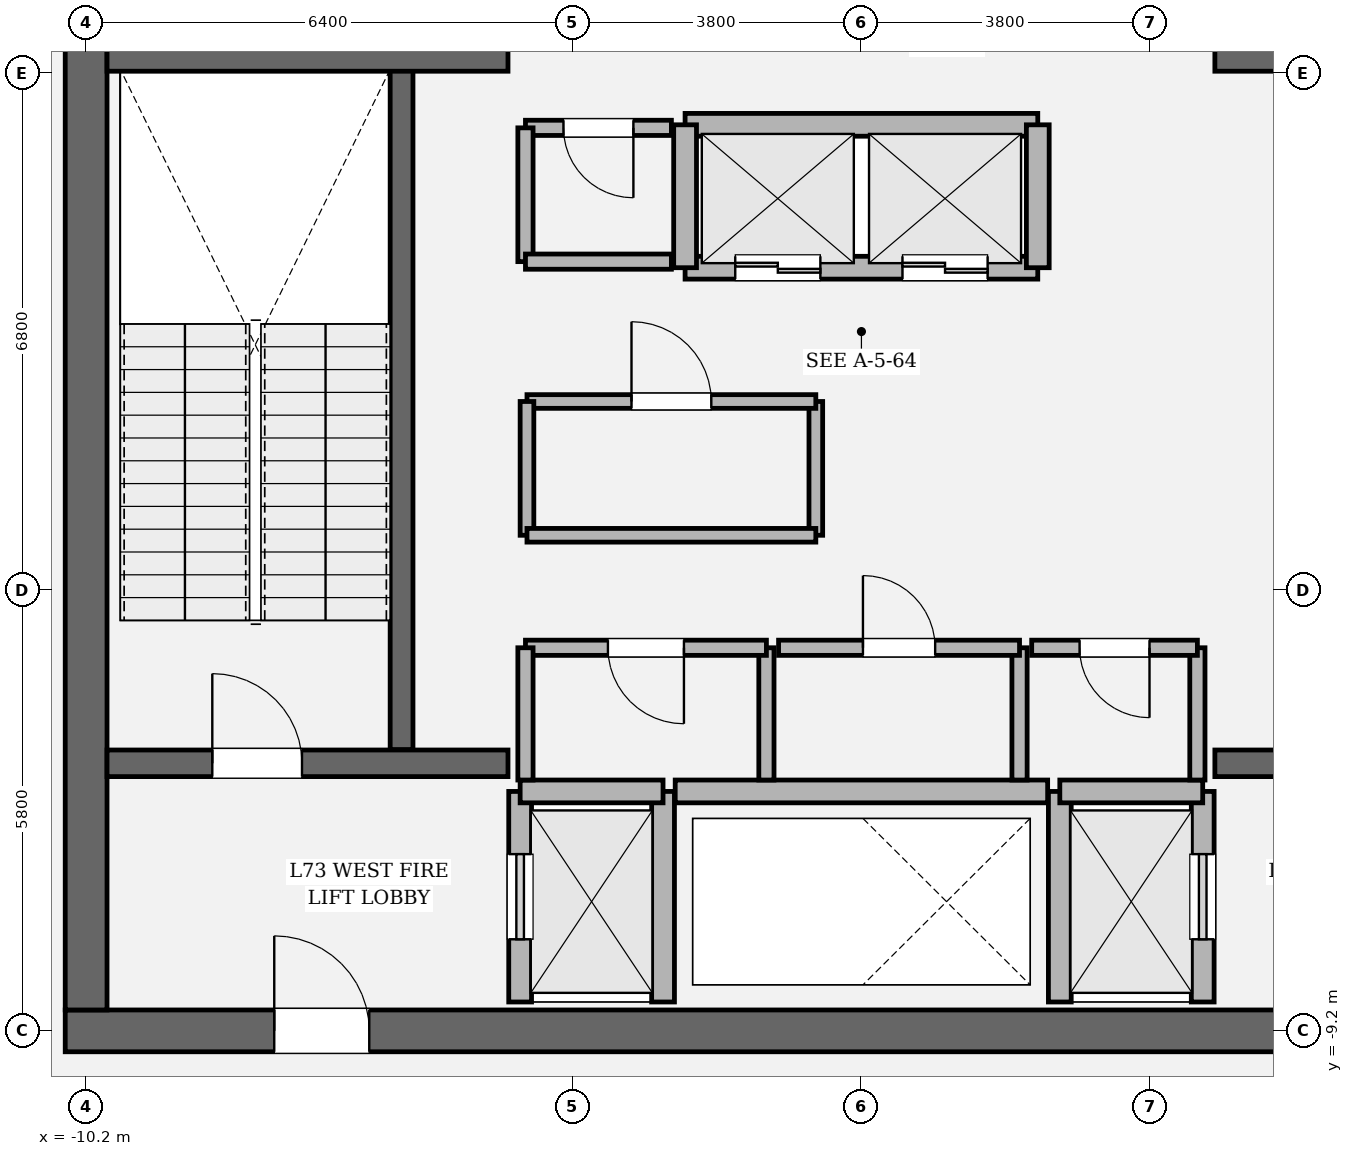
"""IFC4 building model, lengths in metres.
Left out: names, types, materials, properties, quantities, classifications, styles, units other than length and angle.
Written with IfcOpenShell. Run it as: python <this file> out.ifc"""

import sys

from ifc_helpers import new_model, si_unit, direction, frame, frame_2d, origin, place, context, subcontext, project, spatial, rectangle, extrude, element, fill, save


model = new_model("IFC4")
c1 = context("Model", 3, precision=1e-05, world=origin(), true_north=direction((0.0, 1.0)))
c2 = subcontext(c1, "Body", "Model", "MODEL_VIEW")
j1 = project(units=[si_unit("LENGTHUNIT", "METRE"), si_unit("PLANEANGLEUNIT", "RADIAN")], contexts=[c1])
p1 = place(None, origin())
s1 = spatial("IfcSite", under=j1, at=p1, CompositionType="ELEMENT")
p2 = place(p1, origin())
s2 = spatial("IfcBuilding", under=s1, at=p2, CompositionType="ELEMENT")
p3 = place(p2, frame((0.0, 0.0, 309.0)))
s3 = spatial("IfcBuildingStorey", under=s2, at=p3, CompositionType="ELEMENT", Elevation=309.0)
p4 = place(p3, frame((10.475, -9.2, 0.0), z_axis=(0.0, 0.0, 1.0), x_axis=(-1.0, 0.0, 0.0)))
e1 = element("IfcWall", 1, at=p4, inside=s3, PredefinedType="SHEAR", context=c2, shape_type="SweptSolid", body=[
    extrude(rectangle(XDim=20.95, YDim=0.55, at=frame_2d((10.475, 0.0))), origin(), (0.0, 0.0, 1.0), 4.2),
])
p5 = place(p4, frame((2.75, 0.0, 0.0)))
e2 = element("IfcOpeningElement", 2, at=p5, cuts=e1, PredefinedType="OPENING", context=c2, shape_type="SweptSolid", body=[
    extrude(rectangle(XDim=1.25, YDim=2.25, at=frame_2d((0.625, 1.125))), frame((0.0, 0.285, 0.0), z_axis=(0.0, -1.0, 0.0), x_axis=(1.0, 0.0, 0.0)), (0.0, 0.0, 1.0), 0.57),
])
p6 = place(p4, frame((16.95, 0.0, 0.0)))
e3 = element("IfcOpeningElement", 3, at=p6, cuts=e1, PredefinedType="OPENING", context=c2, shape_type="SweptSolid", body=[
    extrude(rectangle(XDim=1.25, YDim=2.25, at=frame_2d((0.625, 1.125))), frame((0.0, 0.285, 0.0), z_axis=(0.0, -1.0, 0.0), x_axis=(1.0, 0.0, 0.0)), (0.0, 0.0, 1.0), 0.57),
])
p7 = place(p3, frame((-10.2, -8.925, 0.0), z_axis=(0.0, 0.0, 1.0), x_axis=(0.0, 1.0, 0.0)))
e4 = element("IfcWall", 4, at=p7, inside=s3, PredefinedType="SHEAR", context=c2, shape_type="SweptSolid", body=[
    extrude(rectangle(XDim=17.85, YDim=0.55, at=frame_2d((8.925, 0.0))), origin(), (0.0, 0.0, 1.0), 4.2),
])
p8 = place(p7, frame((12.715, 0.0, 0.0)))
e5 = element("IfcOpeningElement", 5, at=p8, cuts=e4, PredefinedType="OPENING", context=c2, shape_type="SweptSolid", body=[
    extrude(rectangle(XDim=1.18, YDim=2.2, at=frame_2d((0.59, 1.1))), frame((0.0, 0.285, 0.0), z_axis=(0.0, -1.0, 0.0), x_axis=(1.0, 0.0, 0.0)), (0.0, 0.0, 1.0), 0.57),
])
p9 = place(p3, frame((-6.05, -5.5, 0.0), z_axis=(0.0, 0.0, 1.0), x_axis=(0.0, 1.0, 0.0)))
e6 = element("IfcWall", 6, at=p9, inside=s3, PredefinedType="SOLIDWALL", context=c2, shape_type="SweptSolid", body=[
    extrude(rectangle(XDim=8.95, YDim=0.3, at=frame_2d((4.475, 0.0))), origin(), (0.0, 0.0, 1.0), 4.2),
])
p10 = place(p3, frame((-9.925, -5.68, 0.0), z_axis=(0.0, 0.0, 1.0), x_axis=(1.0, 0.0, 0.0)))
e7 = element("IfcWall", 7, at=p10, inside=s3, PredefinedType="SOLIDWALL", context=c2, shape_type="SweptSolid", body=[
    extrude(rectangle(XDim=5.275, YDim=0.35, at=frame_2d((2.638, 0.0))), origin(), (0.0, 0.0, 1.0), 4.2),
])
p11 = place(p10, frame((1.385, 0.0, 0.0)))
e8 = element("IfcOpeningElement", 8, at=p11, cuts=e7, PredefinedType="OPENING", context=c2, shape_type="SweptSolid", body=[
    extrude(rectangle(XDim=1.18, YDim=2.2, at=frame_2d((0.59, 1.1))), frame((0.0, 0.185, 0.0), z_axis=(0.0, -1.0, 0.0), x_axis=(1.0, 0.0, 0.0)), (0.0, 0.0, 1.0), 0.37),
])
p12 = place(p3, frame((4.65, -5.68, 0.0), z_axis=(0.0, 0.0, 1.0), x_axis=(1.0, 0.0, 0.0)))
e9 = element("IfcWall", 9, at=p12, inside=s3, PredefinedType="SOLIDWALL", context=c2, shape_type="SweptSolid", body=[
    extrude(rectangle(XDim=5.275, YDim=0.35, at=frame_2d((2.638, 0.0))), origin(), (0.0, 0.0, 1.0), 4.2),
])
p13 = place(p12, frame((2.71, 0.0, 0.0)))
e10 = element("IfcOpeningElement", 10, at=p13, cuts=e9, PredefinedType="OPENING", context=c2, shape_type="SweptSolid", body=[
    extrude(rectangle(XDim=1.18, YDim=2.2, at=frame_2d((0.59, 1.1))), frame((0.0, 0.185, 0.0), z_axis=(0.0, -1.0, 0.0), x_axis=(1.0, 0.0, 0.0)), (0.0, 0.0, 1.0), 0.37),
])
for number, where, z_axis, x_axis in (
    (11, (-9.925, 3.6, 0.0), (0.0, 0.0, 1.0), (1.0, 0.0, 0.0)),
    (12, (4.65, 3.6, 0.0), (0.0, 0.0, 1.0), (1.0, 0.0, 0.0)),
):
    element("IfcWall", number, at=place(p3, frame(where, z_axis=z_axis, x_axis=x_axis)), inside=s3, PredefinedType="SOLIDWALL", context=c2, shape_type="SweptSolid", body=[
        extrude(rectangle(XDim=5.275, YDim=0.35, at=frame_2d((2.638, 0.0))), origin(), (0.0, 0.0, 1.0), 4.2),
    ])
p14 = place(p3, frame((-4.49, -8.82, 0.0), z_axis=(0.0, 0.0, 1.0), x_axis=(0.0, 1.0, 0.0)))
e13 = element("IfcWall", 13, at=p14, inside=s3, PredefinedType="SOLIDWALL", context=c2, shape_type="SweptSolid", body=[
    extrude(rectangle(XDim=2.77, YDim=0.3, at=frame_2d((1.385, 0.0))), origin(), (0.0, 0.0, 1.0), 4.0),
])
p15 = place(p14, frame((0.825, 0.0, 0.0)))
e14 = element("IfcOpeningElement", 14, at=p15, cuts=e13, PredefinedType="OPENING", context=c2, shape_type="SweptSolid", body=[
    extrude(rectangle(XDim=1.12, YDim=2.25, at=frame_2d((0.56, 1.125))), frame((0.0, 0.16, 0.0), z_axis=(0.0, -1.0, 0.0), x_axis=(1.0, 0.0, 0.0)), (0.0, 0.0, 1.0), 0.32),
])
p16 = place(p3, frame((-2.61, -8.82, 0.0), z_axis=(0.0, 0.0, 1.0), x_axis=(0.0, 1.0, 0.0)))
e15 = element("IfcWall", 15, at=p16, inside=s3, PredefinedType="SOLIDWALL", context=c2, shape_type="SweptSolid", body=[
    extrude(rectangle(XDim=2.77, YDim=0.3, at=frame_2d((1.385, 0.0))), origin(), (0.0, 0.0, 1.0), 4.0),
])
p17 = place(p3, frame((-4.49, -6.05, 0.0), z_axis=(0.0, 0.0, 1.0), x_axis=(1.0, 0.0, 0.0)))
e16 = element("IfcWall", 16, at=p17, inside=s3, PredefinedType="SOLIDWALL", context=c2, shape_type="SweptSolid", body=[
    extrude(rectangle(XDim=1.88, YDim=0.3, at=frame_2d((0.94, 0.0))), origin(), (0.0, 0.0, 1.0), 4.0),
])
p18 = place(p3, frame((4.49, -8.82, 0.0), z_axis=(0.0, 0.0, 1.0), x_axis=(0.0, 1.0, 0.0)))
e17 = element("IfcWall", 17, at=p18, inside=s3, PredefinedType="SOLIDWALL", context=c2, shape_type="SweptSolid", body=[
    extrude(rectangle(XDim=2.77, YDim=0.3, at=frame_2d((1.385, 0.0))), origin(), (0.0, 0.0, 1.0), 4.0),
])
p19 = place(p18, frame((0.825, 0.0, 0.0)))
e18 = element("IfcOpeningElement", 18, at=p19, cuts=e17, PredefinedType="OPENING", context=c2, shape_type="SweptSolid", body=[
    extrude(rectangle(XDim=1.12, YDim=2.25, at=frame_2d((0.56, 1.125))), frame((0.0, 0.16, 0.0), z_axis=(0.0, -1.0, 0.0), x_axis=(1.0, 0.0, 0.0)), (0.0, 0.0, 1.0), 0.32),
])
p20 = place(p3, frame((2.61, -8.82, 0.0), z_axis=(0.0, 0.0, 1.0), x_axis=(0.0, 1.0, 0.0)))
e19 = element("IfcWall", 19, at=p20, inside=s3, PredefinedType="SOLIDWALL", context=c2, shape_type="SweptSolid", body=[
    extrude(rectangle(XDim=2.77, YDim=0.3, at=frame_2d((1.385, 0.0))), origin(), (0.0, 0.0, 1.0), 4.0),
])
p21 = place(p3, frame((2.61, -6.05, 0.0), z_axis=(0.0, 0.0, 1.0), x_axis=(1.0, 0.0, 0.0)))
e20 = element("IfcWall", 20, at=p21, inside=s3, PredefinedType="SOLIDWALL", context=c2, shape_type="SweptSolid", body=[
    extrude(rectangle(XDim=1.88, YDim=0.3, at=frame_2d((0.94, 0.0))), origin(), (0.0, 0.0, 1.0), 4.0),
])
p22 = place(p3, frame((-2.32, 0.84, 0.0), z_axis=(0.0, 0.0, 1.0), x_axis=(1.0, 0.0, 0.0)))
e21 = element("IfcWall", 21, at=p22, inside=s3, PredefinedType="SOLIDWALL", context=c2, shape_type="SweptSolid", body=[
    extrude(rectangle(XDim=4.64, YDim=0.3, at=frame_2d((2.32, 0.0))), origin(), (0.0, 0.0, 1.0), 4.0),
])
p23 = place(p22, frame((0.66, 0.0, 0.0)))
e22 = element("IfcOpeningElement", 22, at=p23, cuts=e21, PredefinedType="OPENING", context=c2, shape_type="SweptSolid", body=[
    extrude(rectangle(XDim=1.12, YDim=2.25, at=frame_2d((0.56, 1.125))), frame((0.0, 0.16, 0.0), z_axis=(0.0, -1.0, 0.0), x_axis=(1.0, 0.0, 0.0)), (0.0, 0.0, 1.0), 0.32),
])
p24 = place(p22, frame((2.86, 0.0, 0.0)))
e23 = element("IfcOpeningElement", 23, at=p24, cuts=e21, PredefinedType="OPENING", context=c2, shape_type="SweptSolid", body=[
    extrude(rectangle(XDim=1.12, YDim=2.25, at=frame_2d((0.56, 1.125))), frame((0.0, 0.16, 0.0), z_axis=(0.0, -1.0, 0.0), x_axis=(1.0, 0.0, 0.0)), (0.0, 0.0, 1.0), 0.32),
])
p25 = place(p3, frame((-2.32, 2.72, 0.0), z_axis=(0.0, 0.0, 1.0), x_axis=(1.0, 0.0, 0.0)))
e24 = element("IfcWall", 24, at=p25, inside=s3, PredefinedType="SOLIDWALL", context=c2, shape_type="SweptSolid", body=[
    extrude(rectangle(XDim=4.64, YDim=0.3, at=frame_2d((2.32, 0.0))), origin(), (0.0, 0.0, 1.0), 4.0),
])
for number, where, z_axis, x_axis in (
    (25, (-2.32, 0.84, 0.0), (0.0, 0.0, 1.0), (0.0, 1.0, 0.0)),
    (26, (2.32, 0.84, 0.0), (0.0, 0.0, 1.0), (0.0, 1.0, 0.0)),
):
    element("IfcWall", number, at=place(p3, frame(where, z_axis=z_axis, x_axis=x_axis)), inside=s3, PredefinedType="SOLIDWALL", context=c2, shape_type="SweptSolid", body=[
        extrude(rectangle(XDim=1.88, YDim=0.3, at=frame_2d((0.94, 0.0))), origin(), (0.0, 0.0, 1.0), 4.0),
    ])
p26 = place(p3, frame((-2.45, -6.05, 0.0), z_axis=(0.0, 0.0, 1.0), x_axis=(1.0, 0.0, 0.0)))
e27 = element("IfcWall", 27, at=p26, inside=s3, PredefinedType="SOLIDWALL", context=c2, shape_type="SweptSolid", body=[
    extrude(rectangle(XDim=4.9, YDim=0.3, at=frame_2d((2.45, 0.0))), origin(), (0.0, 0.0, 1.0), 4.0),
])
p27 = place(p3, frame((-1.25, -5.9, 0.0), z_axis=(0.0, 0.0, 1.0), x_axis=(0.0, 1.0, 0.0)))
e28 = element("IfcWall", 28, at=p27, inside=s3, PredefinedType="SOLIDWALL", context=c2, shape_type="SweptSolid", body=[
    extrude(rectangle(XDim=1.74, YDim=0.2, at=frame_2d((0.87, 0.0))), origin(), (0.0, 0.0, 1.0), 4.0),
])
p28 = place(p3, frame((-1.25, -4.16, 0.0), z_axis=(0.0, 0.0, 1.0), x_axis=(-1.0, 0.0, 0.0)))
e29 = element("IfcWall", 29, at=p28, inside=s3, PredefinedType="SOLIDWALL", context=c2, shape_type="SweptSolid", body=[
    extrude(rectangle(XDim=3.17, YDim=0.2, at=frame_2d((1.585, 0.0))), origin(), (0.0, 0.0, 1.0), 4.0),
])
p29 = place(p28, frame((1.085, 0.0, 0.0)))
e30 = element("IfcOpeningElement", 30, at=p29, cuts=e29, PredefinedType="OPENING", context=c2, shape_type="SweptSolid", body=[
    extrude(rectangle(XDim=1.0, YDim=2.15, at=frame_2d((0.5, 1.075))), frame((0.0, 0.11, 0.0), z_axis=(0.0, -1.0, 0.0), x_axis=(1.0, 0.0, 0.0)), (0.0, 0.0, 1.0), 0.22),
])
for number, where, z_axis, x_axis in (
    (31, (-4.42, -4.16, 0.0), (0.0, 0.0, 1.0), (0.0, -1.0, 0.0)),
    (32, (2.08, -5.9, 0.0), (0.0, 0.0, 1.0), (0.0, 1.0, 0.0)),
):
    element("IfcWall", number, at=place(p3, frame(where, z_axis=z_axis, x_axis=x_axis)), inside=s3, PredefinedType="SOLIDWALL", context=c2, shape_type="SweptSolid", body=[
        extrude(rectangle(XDim=1.74, YDim=0.2, at=frame_2d((0.87, 0.0))), origin(), (0.0, 0.0, 1.0), 4.0),
    ])
p30 = place(p3, frame((2.08, -4.16, 0.0), z_axis=(0.0, 0.0, 1.0), x_axis=(-1.0, 0.0, 0.0)))
e33 = element("IfcWall", 33, at=p30, inside=s3, PredefinedType="SOLIDWALL", context=c2, shape_type="SweptSolid", body=[
    extrude(rectangle(XDim=3.17, YDim=0.2, at=frame_2d((1.585, 0.0))), origin(), (0.0, 0.0, 1.0), 4.0),
])
p31 = place(p30, frame((1.11, 0.0, 0.0)))
e34 = element("IfcOpeningElement", 34, at=p31, cuts=e33, PredefinedType="OPENING", context=c2, shape_type="SweptSolid", body=[
    extrude(rectangle(XDim=0.95, YDim=2.15, at=frame_2d((0.475, 1.075))), frame((0.0, 0.11, 0.0), z_axis=(0.0, -1.0, 0.0), x_axis=(1.0, 0.0, 0.0)), (0.0, 0.0, 1.0), 0.22),
])
p32 = place(p3, frame((4.42, -5.9, 0.0), z_axis=(0.0, 0.0, 1.0), x_axis=(0.0, 1.0, 0.0)))
e35 = element("IfcWall", 35, at=p32, inside=s3, PredefinedType="SOLIDWALL", context=c2, shape_type="SweptSolid", body=[
    extrude(rectangle(XDim=1.74, YDim=0.2, at=frame_2d((0.87, 0.0))), origin(), (0.0, 0.0, 1.0), 4.0),
])
p33 = place(p3, frame((4.42, -4.16, 0.0), z_axis=(0.0, 0.0, 1.0), x_axis=(-1.0, 0.0, 0.0)))
e36 = element("IfcWall", 36, at=p33, inside=s3, PredefinedType="SOLIDWALL", context=c2, shape_type="SweptSolid", body=[
    extrude(rectangle(XDim=2.18, YDim=0.2, at=frame_2d((1.09, 0.0))), origin(), (0.0, 0.0, 1.0), 4.0),
])
p34 = place(p33, frame((0.63, 0.0, 0.0)))
e37 = element("IfcOpeningElement", 37, at=p34, cuts=e36, PredefinedType="OPENING", context=c2, shape_type="SweptSolid", body=[
    extrude(rectangle(XDim=0.92, YDim=2.1, at=frame_2d((0.46, 1.05))), frame((0.0, 0.11, 0.0), z_axis=(0.0, -1.0, 0.0), x_axis=(1.0, 0.0, 0.0)), (0.0, 0.0, 1.0), 0.22),
])
p35 = place(p3, frame((-0.6, -2.68, 0.0), z_axis=(0.0, 0.0, 1.0), x_axis=(0.0, 1.0, 0.0)))
e38 = element("IfcWall", 38, at=p35, inside=s3, PredefinedType="PARTITIONING", context=c2, shape_type="SweptSolid", body=[
    extrude(rectangle(XDim=1.76, YDim=0.18, at=frame_2d((0.88, 0.0))), origin(), (0.0, 0.0, 1.0), 4.0),
])
p36 = place(p3, frame((-0.6, -0.92, 0.0), z_axis=(0.0, 0.0, 1.0), x_axis=(-1.0, 0.0, 0.0)))
e39 = element("IfcWall", 39, at=p36, inside=s3, PredefinedType="PARTITIONING", context=c2, shape_type="SweptSolid", body=[
    extrude(rectangle(XDim=3.8, YDim=0.18, at=frame_2d((1.9, 0.0))), origin(), (0.0, 0.0, 1.0), 4.0),
])
p37 = place(p36, frame((1.375, 0.0, 0.0)))
e40 = element("IfcOpeningElement", 40, at=p37, cuts=e39, PredefinedType="OPENING", context=c2, shape_type="SweptSolid", body=[
    extrude(rectangle(XDim=1.05, YDim=2.2, at=frame_2d((0.525, 1.1))), frame((0.0, 0.1, 0.0), z_axis=(0.0, -1.0, 0.0), x_axis=(1.0, 0.0, 0.0)), (0.0, 0.0, 1.0), 0.2),
])
p38 = place(p3, frame((-4.4, -0.92, 0.0), z_axis=(0.0, 0.0, 1.0), x_axis=(0.0, -1.0, 0.0)))
e41 = element("IfcWall", 41, at=p38, inside=s3, PredefinedType="PARTITIONING", context=c2, shape_type="SweptSolid", body=[
    extrude(rectangle(XDim=1.76, YDim=0.18, at=frame_2d((0.88, 0.0))), origin(), (0.0, 0.0, 1.0), 4.0),
])
p39 = place(p3, frame((-4.4, -2.68, 0.0), z_axis=(0.0, 0.0, 1.0), x_axis=(1.0, 0.0, 0.0)))
e42 = element("IfcWall", 42, at=p39, inside=s3, PredefinedType="PARTITIONING", context=c2, shape_type="SweptSolid", body=[
    extrude(rectangle(XDim=3.8, YDim=0.18, at=frame_2d((1.9, 0.0))), origin(), (0.0, 0.0, 1.0), 4.0),
])
p40 = place(p3, frame((-2.5, 2.68, 0.0), z_axis=(0.0, 0.0, 1.0), x_axis=(-1.0, 0.0, 0.0)))
e43 = element("IfcWall", 43, at=p40, inside=s3, PredefinedType="SOLIDWALL", context=c2, shape_type="SweptSolid", body=[
    extrude(rectangle(XDim=1.92, YDim=0.2, at=frame_2d((0.96, 0.0))), origin(), (0.0, 0.0, 1.0), 4.0),
])
p41 = place(p40, frame((0.5, 0.0, 0.0)))
e44 = element("IfcOpeningElement", 44, at=p41, cuts=e43, PredefinedType="OPENING", context=c2, shape_type="SweptSolid", body=[
    extrude(rectangle(XDim=0.92, YDim=2.1, at=frame_2d((0.46, 1.05))), frame((0.0, 0.11, 0.0), z_axis=(0.0, -1.0, 0.0), x_axis=(1.0, 0.0, 0.0)), (0.0, 0.0, 1.0), 0.22),
])
p42 = place(p3, frame((-4.42, 2.68, 0.0), z_axis=(0.0, 0.0, 1.0), x_axis=(0.0, -1.0, 0.0)))
e45 = element("IfcWall", 45, at=p42, inside=s3, PredefinedType="SOLIDWALL", context=c2, shape_type="SweptSolid", body=[
    extrude(rectangle(XDim=1.76, YDim=0.2, at=frame_2d((0.88, 0.0))), origin(), (0.0, 0.0, 1.0), 4.0),
])
p43 = place(p3, frame((-4.42, 0.92, 0.0), z_axis=(0.0, 0.0, 1.0), x_axis=(1.0, 0.0, 0.0)))
e46 = element("IfcWall", 46, at=p43, inside=s3, PredefinedType="SOLIDWALL", context=c2, shape_type="SweptSolid", body=[
    extrude(rectangle(XDim=1.92, YDim=0.2, at=frame_2d((0.96, 0.0))), origin(), (0.0, 0.0, 1.0), 4.0),
])
p44 = place(p11, origin())
e47 = element("IfcDoor", 47, at=p44, inside=s3, OperationType="SINGLE_SWING_LEFT", PredefinedType="DOOR", context=c2, shape_type="SweptSolid", body=[
    extrude(rectangle(XDim=1.18, YDim=2.2, at=frame_2d((0.59, 1.1))), frame((0.0, 0.025, 0.0), z_axis=(0.0, -1.0, 0.0), x_axis=(1.0, 0.0, 0.0)), (0.0, 0.0, 1.0), 0.05),
])
fill(e8, e47)
p45 = place(p6, origin())
e48 = element("IfcDoor", 48, at=p45, inside=s3, OperationType="SINGLE_SWING_RIGHT", PredefinedType="DOOR", context=c2, shape_type="SweptSolid", body=[
    extrude(rectangle(XDim=1.25, YDim=2.25, at=frame_2d((0.625, 1.125))), frame((0.0, 0.025, 0.0), z_axis=(0.0, -1.0, 0.0), x_axis=(1.0, 0.0, 0.0)), (0.0, 0.0, 1.0), 0.05),
])
fill(e3, e48)
p46 = place(p15, origin())
e49 = element("IfcDoor", 49, at=p46, inside=s3, OperationType="SLIDING_TO_LEFT", PredefinedType="DOOR", context=c2, shape_type="SweptSolid", body=[
    extrude(rectangle(XDim=1.12, YDim=2.25, at=frame_2d((0.56, 1.125))), frame((0.0, 0.025, 0.0), z_axis=(0.0, -1.0, 0.0), x_axis=(1.0, 0.0, 0.0)), (0.0, 0.0, 1.0), 0.05),
])
fill(e14, e49)
p47 = place(p19, origin())
e50 = element("IfcDoor", 50, at=p47, inside=s3, OperationType="SLIDING_TO_RIGHT", PredefinedType="DOOR", context=c2, shape_type="SweptSolid", body=[
    extrude(rectangle(XDim=1.12, YDim=2.25, at=frame_2d((0.56, 1.125))), frame((0.0, 0.025, 0.0), z_axis=(0.0, -1.0, 0.0), x_axis=(1.0, 0.0, 0.0)), (0.0, 0.0, 1.0), 0.05),
])
fill(e18, e50)
p48 = place(p23, origin())
e51 = element("IfcDoor", 51, at=p48, inside=s3, OperationType="DOUBLE_DOOR_SLIDING", PredefinedType="DOOR", context=c2, shape_type="SweptSolid", body=[
    extrude(rectangle(XDim=1.12, YDim=2.25, at=frame_2d((0.56, 1.125))), frame((0.0, 0.025, 0.0), z_axis=(0.0, -1.0, 0.0), x_axis=(1.0, 0.0, 0.0)), (0.0, 0.0, 1.0), 0.05),
])
fill(e22, e51)
p49 = place(p24, origin())
e52 = element("IfcDoor", 52, at=p49, inside=s3, OperationType="DOUBLE_DOOR_SLIDING", PredefinedType="DOOR", context=c2, shape_type="SweptSolid", body=[
    extrude(rectangle(XDim=1.12, YDim=2.25, at=frame_2d((0.56, 1.125))), frame((0.0, 0.025, 0.0), z_axis=(0.0, -1.0, 0.0), x_axis=(1.0, 0.0, 0.0)), (0.0, 0.0, 1.0), 0.05),
])
fill(e23, e52)
p50 = place(p29, origin())
e53 = element("IfcDoor", 53, at=p50, inside=s3, OperationType="SINGLE_SWING_LEFT", PredefinedType="DOOR", context=c2, shape_type="SweptSolid", body=[
    extrude(rectangle(XDim=1.0, YDim=2.15, at=frame_2d((0.5, 1.075))), frame((0.0, 0.025, 0.0), z_axis=(0.0, -1.0, 0.0), x_axis=(1.0, 0.0, 0.0)), (0.0, 0.0, 1.0), 0.05),
])
fill(e30, e53)
p51 = place(p31, origin())
e54 = element("IfcDoor", 54, at=p51, inside=s3, OperationType="SINGLE_SWING_RIGHT", PredefinedType="DOOR", context=c2, shape_type="SweptSolid", body=[
    extrude(rectangle(XDim=0.95, YDim=2.15, at=frame_2d((0.475, 1.075))), frame((0.0, 0.025, 0.0), z_axis=(0.0, -1.0, 0.0), x_axis=(1.0, 0.0, 0.0)), (0.0, 0.0, 1.0), 0.05),
])
fill(e34, e54)
p52 = place(p34, origin())
e55 = element("IfcDoor", 55, at=p52, inside=s3, OperationType="SINGLE_SWING_LEFT", PredefinedType="DOOR", context=c2, shape_type="SweptSolid", body=[
    extrude(rectangle(XDim=0.92, YDim=2.1, at=frame_2d((0.46, 1.05))), frame((0.0, 0.025, 0.0), z_axis=(0.0, -1.0, 0.0), x_axis=(1.0, 0.0, 0.0)), (0.0, 0.0, 1.0), 0.05),
])
fill(e37, e55)
p53 = place(p37, origin())
e56 = element("IfcDoor", 56, at=p53, inside=s3, OperationType="SINGLE_SWING_RIGHT", PredefinedType="DOOR", context=c2, shape_type="SweptSolid", body=[
    extrude(rectangle(XDim=1.05, YDim=2.2, at=frame_2d((0.525, 1.1))), frame((0.0, 0.025, 0.0), z_axis=(0.0, -1.0, 0.0), x_axis=(1.0, 0.0, 0.0)), (0.0, 0.0, 1.0), 0.05),
])
fill(e40, e56)
p54 = place(p41, origin())
e57 = element("IfcDoor", 57, at=p54, inside=s3, OperationType="SINGLE_SWING_LEFT", PredefinedType="DOOR", context=c2, shape_type="SweptSolid", body=[
    extrude(rectangle(XDim=0.92, YDim=2.1, at=frame_2d((0.46, 1.05))), frame((0.0, 0.025, 0.0), z_axis=(0.0, -1.0, 0.0), x_axis=(1.0, 0.0, 0.0)), (0.0, 0.0, 1.0), 0.05),
])
fill(e44, e57)
save(model, sys.argv[1])
